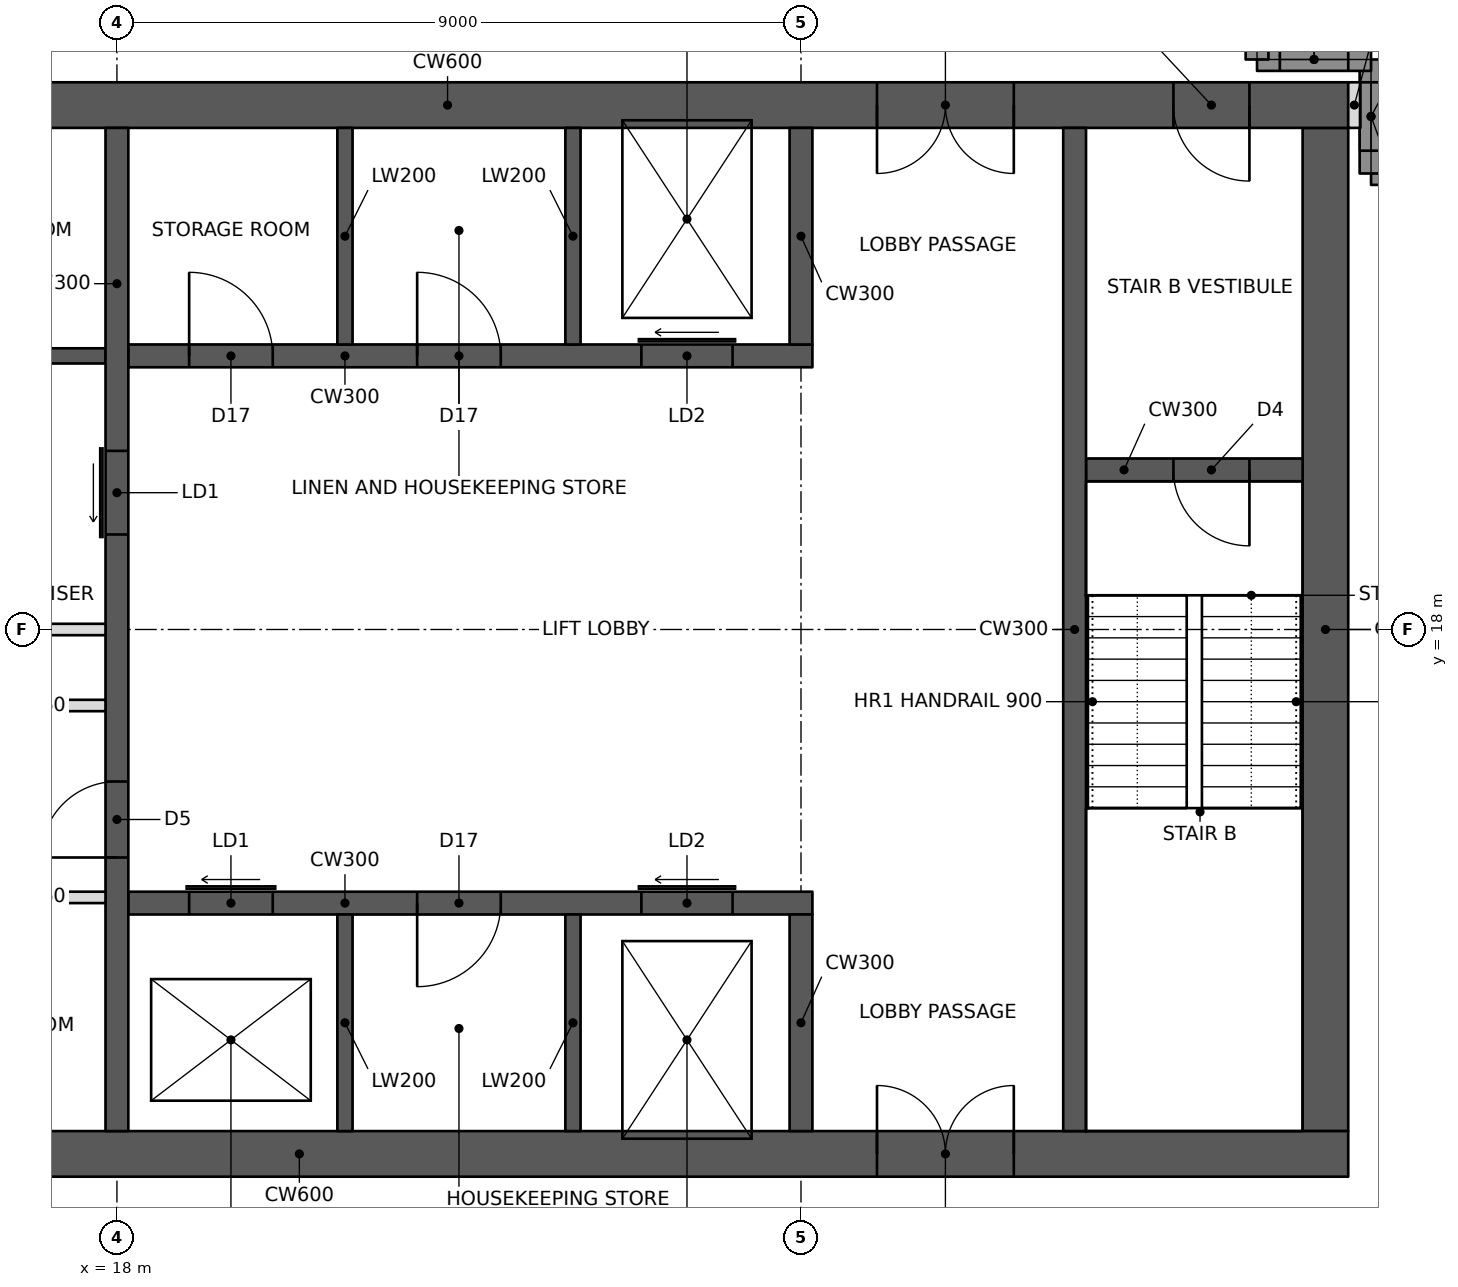
"""IFC4 building model, lengths in metres.
Left out: names, types, materials, properties, quantities, classifications, styles, units other than length and angle.
Written with IfcOpenShell. Run it as: python <this file> out.ifc"""

import sys

from ifc_helpers import new_model, si_unit, direction, frame, frame_2d, origin, place, context, subcontext, project, spatial, rectangle, extrude, element, fill, save


model = new_model("IFC4")
c1 = context("Model", 3, precision=1e-05, world=origin(), true_north=direction((0.0, 1.0)))
c2 = subcontext(c1, "Body", "Model", "MODEL_VIEW")
j1 = project(units=[si_unit("LENGTHUNIT", "METRE"), si_unit("PLANEANGLEUNIT", "RADIAN")], contexts=[c1])
p1 = place(None, origin())
s1 = spatial("IfcSite", under=j1, at=p1, CompositionType="ELEMENT")
p2 = place(p1, origin())
s2 = spatial("IfcBuilding", under=s1, at=p2, CompositionType="ELEMENT")
p3 = place(p2, frame((0.0, 0.0, 230.2)))
s3 = spatial("IfcBuildingStorey", under=s2, at=p3, CompositionType="ELEMENT", Elevation=230.2)
p4 = place(p3, frame((10.8, 11.1, 0.0), z_axis=(0.0, 0.0, 1.0), x_axis=(1.0, 0.0, 0.0)))
e1 = element("IfcWall", 1, at=p4, inside=s3, PredefinedType="SHEAR", context=c2, shape_type="SweptSolid", body=[
    extrude(rectangle(XDim=23.4, YDim=0.6, at=frame_2d((11.7, 0.0))), origin(), (0.0, 0.0, 1.0), 3.6),
])
p5 = place(p4, frame((1.0, 0.0, 0.0)))
e2 = element("IfcOpeningElement", 2, at=p5, cuts=e1, PredefinedType="OPENING", context=c2, shape_type="SweptSolid", body=[
    extrude(rectangle(XDim=1.0, YDim=2.1, at=frame_2d((0.5, 1.05))), frame((0.0, 0.31, 0.0), z_axis=(0.0, -1.0, 0.0), x_axis=(1.0, 0.0, 0.0)), (0.0, 0.0, 1.0), 0.62),
])
p6 = place(p4, frame((17.2, 0.0, 0.0)))
e3 = element("IfcOpeningElement", 3, at=p6, cuts=e1, PredefinedType="OPENING", context=c2, shape_type="SweptSolid", body=[
    extrude(rectangle(XDim=1.8, YDim=2.1, at=frame_2d((0.9, 1.05))), frame((0.0, 0.31, 0.0), z_axis=(0.0, -1.0, 0.0), x_axis=(1.0, 0.0, 0.0)), (0.0, 0.0, 1.0), 0.62),
])
p7 = place(p3, frame((10.8, 24.9, 0.0), z_axis=(0.0, 0.0, 1.0), x_axis=(1.0, 0.0, 0.0)))
e4 = element("IfcWall", 4, at=p7, inside=s3, PredefinedType="SHEAR", context=c2, shape_type="SweptSolid", body=[
    extrude(rectangle(XDim=23.4, YDim=0.6, at=frame_2d((11.7, 0.0))), origin(), (0.0, 0.0, 1.0), 3.6),
])
p8 = place(p7, frame((17.2, 0.0, 0.0)))
e5 = element("IfcOpeningElement", 5, at=p8, cuts=e4, PredefinedType="OPENING", context=c2, shape_type="SweptSolid", body=[
    extrude(rectangle(XDim=1.8, YDim=2.1, at=frame_2d((0.9, 1.05))), frame((0.0, 0.31, 0.0), z_axis=(0.0, -1.0, 0.0), x_axis=(1.0, 0.0, 0.0)), (0.0, 0.0, 1.0), 0.62),
])
p9 = place(p7, frame((21.1, 0.0, 0.0)))
e6 = element("IfcOpeningElement", 6, at=p9, cuts=e4, PredefinedType="OPENING", context=c2, shape_type="SweptSolid", body=[
    extrude(rectangle(XDim=1.0, YDim=2.1, at=frame_2d((0.5, 1.05))), frame((0.0, 0.31, 0.0), z_axis=(0.0, -1.0, 0.0), x_axis=(1.0, 0.0, 0.0)), (0.0, 0.0, 1.0), 0.62),
])
p10 = place(p7, frame((4.9, 0.0, 0.0)))
e7 = element("IfcOpeningElement", 7, at=p10, cuts=e4, PredefinedType="OPENING", context=c2, shape_type="SweptSolid", body=[
    extrude(rectangle(XDim=1.0, YDim=2.1, at=frame_2d((0.5, 1.05))), frame((0.0, 0.31, 0.0), z_axis=(0.0, -1.0, 0.0), x_axis=(1.0, 0.0, 0.0)), (0.0, 0.0, 1.0), 0.62),
])
p11 = place(p3, frame((33.9, 11.4, 0.0), z_axis=(0.0, 0.0, 1.0), x_axis=(0.0, 1.0, 0.0)))
e8 = element("IfcWall", 8, at=p11, inside=s3, PredefinedType="SHEAR", context=c2, shape_type="SweptSolid", body=[
    extrude(rectangle(XDim=13.2, YDim=0.6, at=frame_2d((6.6, 0.0))), origin(), (0.0, 0.0, 1.0), 3.6),
])
p12 = place(p3, frame((18.0, 11.4, 0.0), z_axis=(0.0, 0.0, 1.0), x_axis=(0.0, 1.0, 0.0)))
e9 = element("IfcWall", 9, at=p12, inside=s3, PredefinedType="SHEAR", context=c2, shape_type="SweptSolid", body=[
    extrude(rectangle(XDim=13.2, YDim=0.3, at=frame_2d((6.6, 0.0))), origin(), (0.0, 0.0, 1.0), 3.6),
])
p13 = place(p12, frame((3.6, 0.0, 0.0)))
e10 = element("IfcOpeningElement", 10, at=p13, cuts=e9, PredefinedType="OPENING", context=c2, shape_type="SweptSolid", body=[
    extrude(rectangle(XDim=1.0, YDim=2.1, at=frame_2d((0.5, 1.05))), frame((0.0, 0.16, 0.0), z_axis=(0.0, -1.0, 0.0), x_axis=(1.0, 0.0, 0.0)), (0.0, 0.0, 1.0), 0.32),
])
p14 = place(p12, frame((7.85, 0.0, 0.0)))
e11 = element("IfcOpeningElement", 11, at=p14, cuts=e9, PredefinedType="OPENING", context=c2, shape_type="SweptSolid", body=[
    extrude(rectangle(XDim=1.1, YDim=2.1, at=frame_2d((0.55, 1.05))), frame((0.0, 0.16, 0.0), z_axis=(0.0, -1.0, 0.0), x_axis=(1.0, 0.0, 0.0)), (0.0, 0.0, 1.0), 0.32),
])
p15 = place(p3, frame((14.55, 18.0, 0.0), z_axis=(0.0, 0.0, 1.0), x_axis=(1.0, 0.0, 0.0)))
e12 = element("IfcWall", 12, at=p15, inside=s3, PredefinedType="PARTITIONING", context=c2, shape_type="SweptSolid", body=[
    extrude(rectangle(XDim=3.3, YDim=0.15, at=frame_2d((1.65, 0.0))), origin(), (0.0, 0.0, 1.0), 3.4),
])
p16 = place(p3, frame((18.15, 14.4, 0.0), z_axis=(0.0, 0.0, 1.0), x_axis=(1.0, 0.0, 0.0)))
e13 = element("IfcWall", 13, at=p16, inside=s3, PredefinedType="SHEAR", context=c2, shape_type="SweptSolid", body=[
    extrude(rectangle(XDim=9.0, YDim=0.3, at=frame_2d((4.5, 0.0))), origin(), (0.0, 0.0, 1.0), 3.6),
])
p17 = place(p16, frame((0.8, 0.0, 0.0)))
e14 = element("IfcOpeningElement", 14, at=p17, cuts=e13, PredefinedType="OPENING", context=c2, shape_type="SweptSolid", body=[
    extrude(rectangle(XDim=1.1, YDim=2.1, at=frame_2d((0.55, 1.05))), frame((0.0, 0.16, 0.0), z_axis=(0.0, -1.0, 0.0), x_axis=(1.0, 0.0, 0.0)), (0.0, 0.0, 1.0), 0.32),
])
p18 = place(p16, frame((6.75, 0.0, 0.0)))
e15 = element("IfcOpeningElement", 15, at=p18, cuts=e13, PredefinedType="OPENING", context=c2, shape_type="SweptSolid", body=[
    extrude(rectangle(XDim=1.2, YDim=2.1, at=frame_2d((0.6, 1.05))), frame((0.0, 0.16, 0.0), z_axis=(0.0, -1.0, 0.0), x_axis=(1.0, 0.0, 0.0)), (0.0, 0.0, 1.0), 0.32),
])
p19 = place(p16, frame((3.8, 0.0, 0.0)))
e16 = element("IfcOpeningElement", 16, at=p19, cuts=e13, PredefinedType="OPENING", context=c2, shape_type="SweptSolid", body=[
    extrude(rectangle(XDim=1.1, YDim=2.1, at=frame_2d((0.55, 1.05))), frame((0.0, 0.16, 0.0), z_axis=(0.0, -1.0, 0.0), x_axis=(1.0, 0.0, 0.0)), (0.0, 0.0, 1.0), 0.32),
])
p20 = place(p3, frame((27.0, 11.4, 0.0), z_axis=(0.0, 0.0, 1.0), x_axis=(0.0, 1.0, 0.0)))
e17 = element("IfcWall", 17, at=p20, inside=s3, PredefinedType="SHEAR", context=c2, shape_type="SweptSolid", body=[
    extrude(rectangle(XDim=2.85, YDim=0.3, at=frame_2d((1.425, 0.0))), origin(), (0.0, 0.0, 1.0), 3.6),
])
for number, where, z_axis, x_axis in (
    (18, (21.0, 11.4, 0.0), (0.0, 0.0, 1.0), (0.0, 1.0, 0.0)),
    (19, (24.0, 11.4, 0.0), (0.0, 0.0, 1.0), (0.0, 1.0, 0.0)),
):
    element("IfcWall", number, at=place(p3, frame(where, z_axis=z_axis, x_axis=x_axis)), inside=s3, PredefinedType="SHEAR", context=c2, shape_type="SweptSolid", body=[
        extrude(rectangle(XDim=2.85, YDim=0.2, at=frame_2d((1.425, 0.0))), origin(), (0.0, 0.0, 1.0), 3.6),
    ])
p21 = place(p3, frame((18.15, 21.6, 0.0), z_axis=(0.0, 0.0, 1.0), x_axis=(1.0, 0.0, 0.0)))
e20 = element("IfcWall", 20, at=p21, inside=s3, PredefinedType="SHEAR", context=c2, shape_type="SweptSolid", body=[
    extrude(rectangle(XDim=9.0, YDim=0.3, at=frame_2d((4.5, 0.0))), origin(), (0.0, 0.0, 1.0), 3.6),
])
p22 = place(p21, frame((6.75, 0.0, 0.0)))
e21 = element("IfcOpeningElement", 21, at=p22, cuts=e20, PredefinedType="OPENING", context=c2, shape_type="SweptSolid", body=[
    extrude(rectangle(XDim=1.2, YDim=2.1, at=frame_2d((0.6, 1.05))), frame((0.0, 0.16, 0.0), z_axis=(0.0, -1.0, 0.0), x_axis=(1.0, 0.0, 0.0)), (0.0, 0.0, 1.0), 0.32),
])
p23 = place(p21, frame((0.8, 0.0, 0.0)))
e22 = element("IfcOpeningElement", 22, at=p23, cuts=e20, PredefinedType="OPENING", context=c2, shape_type="SweptSolid", body=[
    extrude(rectangle(XDim=1.1, YDim=2.1, at=frame_2d((0.55, 1.05))), frame((0.0, 0.16, 0.0), z_axis=(0.0, -1.0, 0.0), x_axis=(1.0, 0.0, 0.0)), (0.0, 0.0, 1.0), 0.32),
])
p24 = place(p21, frame((3.8, 0.0, 0.0)))
e23 = element("IfcOpeningElement", 23, at=p24, cuts=e20, PredefinedType="OPENING", context=c2, shape_type="SweptSolid", body=[
    extrude(rectangle(XDim=1.1, YDim=2.1, at=frame_2d((0.55, 1.05))), frame((0.0, 0.16, 0.0), z_axis=(0.0, -1.0, 0.0), x_axis=(1.0, 0.0, 0.0)), (0.0, 0.0, 1.0), 0.32),
])
p25 = place(p3, frame((27.0, 21.75, 0.0), z_axis=(0.0, 0.0, 1.0), x_axis=(0.0, 1.0, 0.0)))
e24 = element("IfcWall", 24, at=p25, inside=s3, PredefinedType="SHEAR", context=c2, shape_type="SweptSolid", body=[
    extrude(rectangle(XDim=2.85, YDim=0.3, at=frame_2d((1.425, 0.0))), origin(), (0.0, 0.0, 1.0), 3.6),
])
for number, where, z_axis, x_axis in (
    (25, (21.0, 21.75, 0.0), (0.0, 0.0, 1.0), (0.0, 1.0, 0.0)),
    (26, (24.0, 21.75, 0.0), (0.0, 0.0, 1.0), (0.0, 1.0, 0.0)),
):
    element("IfcWall", number, at=place(p3, frame(where, z_axis=z_axis, x_axis=x_axis)), inside=s3, PredefinedType="SHEAR", context=c2, shape_type="SweptSolid", body=[
        extrude(rectangle(XDim=2.85, YDim=0.2, at=frame_2d((1.425, 0.0))), origin(), (0.0, 0.0, 1.0), 3.6),
    ])
p26 = place(p3, frame((30.6, 11.4, 0.0), z_axis=(0.0, 0.0, 1.0), x_axis=(0.0, 1.0, 0.0)))
e27 = element("IfcWall", 27, at=p26, inside=s3, PredefinedType="SHEAR", context=c2, shape_type="SweptSolid", body=[
    extrude(rectangle(XDim=13.2, YDim=0.3, at=frame_2d((6.6, 0.0))), origin(), (0.0, 0.0, 1.0), 3.6),
])
p27 = place(p3, frame((30.75, 20.1, 0.0), z_axis=(0.0, 0.0, 1.0), x_axis=(1.0, 0.0, 0.0)))
e28 = element("IfcWall", 28, at=p27, inside=s3, PredefinedType="SHEAR", context=c2, shape_type="SweptSolid", body=[
    extrude(rectangle(XDim=2.85, YDim=0.3, at=frame_2d((1.425, 0.0))), origin(), (0.0, 0.0, 1.0), 3.6),
])
p28 = place(p27, frame((1.15, 0.0, 0.0)))
e29 = element("IfcOpeningElement", 29, at=p28, cuts=e28, PredefinedType="OPENING", context=c2, shape_type="SweptSolid", body=[
    extrude(rectangle(XDim=1.0, YDim=2.1, at=frame_2d((0.5, 1.05))), frame((0.0, 0.16, 0.0), z_axis=(0.0, -1.0, 0.0), x_axis=(1.0, 0.0, 0.0)), (0.0, 0.0, 1.0), 0.32),
])
p29 = place(p3, frame((14.55, 21.6, 0.0), z_axis=(0.0, 0.0, 1.0), x_axis=(1.0, 0.0, 0.0)))
e30 = element("IfcWall", 30, at=p29, inside=s3, PredefinedType="SHEAR", context=c2, shape_type="SweptSolid", body=[
    extrude(rectangle(XDim=3.3, YDim=0.2, at=frame_2d((1.65, 0.0))), origin(), (0.0, 0.0, 1.0), 3.6),
])
p30 = place(p3, frame((36.0, 24.0, 0.0), z_axis=(0.0, 0.0, 1.0), x_axis=(-1.0, 0.0, 0.0)))
e31 = element("IfcWall", 31, at=p30, inside=s3, PredefinedType="SOLIDWALL", context=c2, shape_type="SweptSolid", body=[
    extrude(rectangle(XDim=1.5, YDim=0.3, at=frame_2d((0.75, 0.0))), origin(), (0.0, 0.0, 1.0), 2.62),
])
p31 = place(p3, frame((34.5, 24.0, 0.0), z_axis=(0.0, 0.0, 1.0), x_axis=(0.0, 1.0, 0.0)))
e32 = element("IfcWall", 32, at=p31, inside=s3, PredefinedType="SOLIDWALL", context=c2, shape_type="SweptSolid", body=[
    extrude(rectangle(XDim=1.5, YDim=0.3, at=frame_2d((0.75, 0.0))), origin(), (0.0, 0.0, 1.0), 3.4),
])
p32 = place(p31, frame((0.3, 0.0, 0.6)))
e33 = element("IfcOpeningElement", 33, at=p32, cuts=e32, PredefinedType="OPENING", context=c2, shape_type="SweptSolid", body=[
    extrude(rectangle(XDim=0.9, YDim=2.2, at=frame_2d((0.45, 1.1))), frame((0.0, 0.16, 0.0), z_axis=(0.0, -1.0, 0.0), x_axis=(1.0, 0.0, 0.0)), (0.0, 0.0, 1.0), 0.32),
])
p33 = place(p3, frame((34.5, 25.5, 0.0), z_axis=(0.0, 0.0, 1.0), x_axis=(-1.0, 0.0, 0.0)))
e34 = element("IfcWall", 34, at=p33, inside=s3, PredefinedType="SOLIDWALL", context=c2, shape_type="SweptSolid", body=[
    extrude(rectangle(XDim=1.5, YDim=0.3, at=frame_2d((0.75, 0.0))), origin(), (0.0, 0.0, 1.0), 3.4),
])
p34 = place(p33, frame((0.3, 0.0, 0.6)))
e35 = element("IfcOpeningElement", 35, at=p34, cuts=e34, PredefinedType="OPENING", context=c2, shape_type="SweptSolid", body=[
    extrude(rectangle(XDim=0.9, YDim=2.2, at=frame_2d((0.45, 1.1))), frame((0.0, 0.16, 0.0), z_axis=(0.0, -1.0, 0.0), x_axis=(1.0, 0.0, 0.0)), (0.0, 0.0, 1.0), 0.32),
])
p35 = place(p3, frame((33.0, 25.5, 0.0), z_axis=(0.0, 0.0, 1.0), x_axis=(0.0, 1.0, 0.0)))
e36 = element("IfcWall", 36, at=p35, inside=s3, PredefinedType="SOLIDWALL", context=c2, shape_type="SweptSolid", body=[
    extrude(rectangle(XDim=1.5, YDim=0.3, at=frame_2d((0.75, 0.0))), origin(), (0.0, 0.0, 1.0), 2.62),
])
p36 = place(p3, frame((34.2, 24.9, 0.0), z_axis=(0.0, 0.0, 1.0), x_axis=(1.0, 0.0, 0.0)))
e37 = element("IfcWall", 37, at=p36, inside=s3, PredefinedType="PARTITIONING", context=c2, shape_type="SweptSolid", body=[
    extrude(rectangle(XDim=0.16, YDim=0.6, at=frame_2d((0.08, 0.0))), origin(), (0.0, 0.0, 1.0), 3.4),
])
p37 = place(p3, frame((14.55, 17.0, 0.0), z_axis=(0.0, 0.0, 1.0), x_axis=(1.0, 0.0, 0.0)))
e38 = element("IfcWall", 38, at=p37, inside=s3, PredefinedType="PARTITIONING", context=c2, shape_type="SweptSolid", body=[
    extrude(rectangle(XDim=3.3, YDim=0.15, at=frame_2d((1.65, 0.0))), origin(), (0.0, 0.0, 1.0), 3.4),
])
p38 = place(p37, frame((0.3, 0.0, 0.0)))
e39 = element("IfcOpeningElement", 39, at=p38, cuts=e38, PredefinedType="OPENING", context=c2, shape_type="SweptSolid", body=[
    extrude(rectangle(XDim=1.0, YDim=2.1, at=frame_2d((0.5, 1.05))), frame((0.0, 0.085, 0.0), z_axis=(0.0, -1.0, 0.0), x_axis=(1.0, 0.0, 0.0)), (0.0, 0.0, 1.0), 0.17),
])
p39 = place(p3, frame((14.55, 14.475, 0.0), z_axis=(0.0, 0.0, 1.0), x_axis=(1.0, 0.0, 0.0)))
e40 = element("IfcWall", 40, at=p39, inside=s3, PredefinedType="PARTITIONING", context=c2, shape_type="SweptSolid", body=[
    extrude(rectangle(XDim=3.3, YDim=0.15, at=frame_2d((1.65, 0.0))), origin(), (0.0, 0.0, 1.0), 3.4),
])
p40 = place(p39, frame((0.3, 0.0, 0.0)))
e41 = element("IfcOpeningElement", 41, at=p40, cuts=e40, PredefinedType="OPENING", context=c2, shape_type="SweptSolid", body=[
    extrude(rectangle(XDim=1.0, YDim=2.1, at=frame_2d((0.5, 1.05))), frame((0.0, 0.085, 0.0), z_axis=(0.0, -1.0, 0.0), x_axis=(1.0, 0.0, 0.0)), (0.0, 0.0, 1.0), 0.17),
])
p41 = place(p32, origin())
e42 = element("IfcWindow", 42, at=p41, inside=s3, PartitioningType="SINGLE_PANEL", PredefinedType="WINDOW", context=c2, shape_type="SweptSolid", body=[
    extrude(rectangle(XDim=0.9, YDim=2.2, at=frame_2d((0.45, 1.1))), frame((0.0, 0.03, 0.0), z_axis=(0.0, -1.0, 0.0), x_axis=(1.0, 0.0, 0.0)), (0.0, 0.0, 1.0), 0.06),
])
fill(e33, e42)
p42 = place(p34, origin())
e43 = element("IfcWindow", 43, at=p42, inside=s3, PartitioningType="SINGLE_PANEL", PredefinedType="WINDOW", context=c2, shape_type="SweptSolid", body=[
    extrude(rectangle(XDim=0.9, YDim=2.2, at=frame_2d((0.45, 1.1))), frame((0.0, 0.03, 0.0), z_axis=(0.0, -1.0, 0.0), x_axis=(1.0, 0.0, 0.0)), (0.0, 0.0, 1.0), 0.06),
])
fill(e35, e43)
p43 = place(p6, origin())
e44 = element("IfcDoor", 44, at=p43, inside=s3, OperationType="DOUBLE_DOOR_SINGLE_SWING", PredefinedType="DOOR", context=c2, shape_type="SweptSolid", body=[
    extrude(rectangle(XDim=1.8, YDim=2.1, at=frame_2d((0.9, 1.05))), frame((0.0, 0.025, 0.0), z_axis=(0.0, -1.0, 0.0), x_axis=(1.0, 0.0, 0.0)), (0.0, 0.0, 1.0), 0.05),
])
fill(e3, e44)
p44 = place(p8, frame((1.8, 0.0, 0.0), z_axis=(0.0, 0.0, 1.0), x_axis=(-1.0, 0.0, 0.0)))
e45 = element("IfcDoor", 45, at=p44, inside=s3, OperationType="DOUBLE_DOOR_SINGLE_SWING", PredefinedType="DOOR", context=c2, shape_type="SweptSolid", body=[
    extrude(rectangle(XDim=1.8, YDim=2.1, at=frame_2d((0.9, 1.05))), frame((0.0, 0.025, 0.0), z_axis=(0.0, -1.0, 0.0), x_axis=(1.0, 0.0, 0.0)), (0.0, 0.0, 1.0), 0.05),
])
fill(e5, e45)
p45 = place(p9, frame((1.0, 0.0, 0.0), z_axis=(0.0, 0.0, 1.0), x_axis=(-1.0, 0.0, 0.0)))
e46 = element("IfcDoor", 46, at=p45, inside=s3, OperationType="SINGLE_SWING_LEFT", PredefinedType="DOOR", context=c2, shape_type="SweptSolid", body=[
    extrude(rectangle(XDim=1.0, YDim=2.1, at=frame_2d((0.5, 1.05))), frame((0.0, 0.025, 0.0), z_axis=(0.0, -1.0, 0.0), x_axis=(1.0, 0.0, 0.0)), (0.0, 0.0, 1.0), 0.05),
])
fill(e6, e46)
p46 = place(p28, frame((1.0, 0.0, 0.0), z_axis=(0.0, 0.0, 1.0), x_axis=(-1.0, 0.0, 0.0)))
e47 = element("IfcDoor", 47, at=p46, inside=s3, OperationType="SINGLE_SWING_LEFT", PredefinedType="DOOR", context=c2, shape_type="SweptSolid", body=[
    extrude(rectangle(XDim=1.0, YDim=2.1, at=frame_2d((0.5, 1.05))), frame((0.0, 0.025, 0.0), z_axis=(0.0, -1.0, 0.0), x_axis=(1.0, 0.0, 0.0)), (0.0, 0.0, 1.0), 0.05),
])
fill(e29, e47)
p47 = place(p13, origin())
e48 = element("IfcDoor", 48, at=p47, inside=s3, OperationType="SINGLE_SWING_LEFT", PredefinedType="DOOR", context=c2, shape_type="SweptSolid", body=[
    extrude(rectangle(XDim=1.0, YDim=2.1, at=frame_2d((0.5, 1.05))), frame((0.0, 0.025, 0.0), z_axis=(0.0, -1.0, 0.0), x_axis=(1.0, 0.0, 0.0)), (0.0, 0.0, 1.0), 0.05),
])
fill(e10, e48)
p48 = place(p17, origin())
e49 = element("IfcDoor", 49, at=p48, inside=s3, OperationType="SLIDING_TO_LEFT", PredefinedType="DOOR", context=c2, shape_type="SweptSolid", body=[
    extrude(rectangle(XDim=1.1, YDim=2.1, at=frame_2d((0.55, 1.05))), frame((0.0, 0.025, 0.0), z_axis=(0.0, -1.0, 0.0), x_axis=(1.0, 0.0, 0.0)), (0.0, 0.0, 1.0), 0.05),
])
fill(e14, e49)
p49 = place(p14, origin())
e50 = element("IfcDoor", 50, at=p49, inside=s3, OperationType="SLIDING_TO_LEFT", PredefinedType="DOOR", context=c2, shape_type="SweptSolid", body=[
    extrude(rectangle(XDim=1.1, YDim=2.1, at=frame_2d((0.55, 1.05))), frame((0.0, 0.025, 0.0), z_axis=(0.0, -1.0, 0.0), x_axis=(1.0, 0.0, 0.0)), (0.0, 0.0, 1.0), 0.05),
])
fill(e11, e50)
p50 = place(p18, origin())
e51 = element("IfcDoor", 51, at=p50, inside=s3, OperationType="SLIDING_TO_LEFT", PredefinedType="DOOR", context=c2, shape_type="SweptSolid", body=[
    extrude(rectangle(XDim=1.2, YDim=2.1, at=frame_2d((0.6, 1.05))), frame((0.0, 0.025, 0.0), z_axis=(0.0, -1.0, 0.0), x_axis=(1.0, 0.0, 0.0)), (0.0, 0.0, 1.0), 0.05),
])
fill(e15, e51)
p51 = place(p22, origin())
e52 = element("IfcDoor", 52, at=p51, inside=s3, OperationType="SLIDING_TO_LEFT", PredefinedType="DOOR", context=c2, shape_type="SweptSolid", body=[
    extrude(rectangle(XDim=1.2, YDim=2.1, at=frame_2d((0.6, 1.05))), frame((0.0, 0.025, 0.0), z_axis=(0.0, -1.0, 0.0), x_axis=(1.0, 0.0, 0.0)), (0.0, 0.0, 1.0), 0.05),
])
fill(e21, e52)
p52 = place(p23, origin())
e53 = element("IfcDoor", 53, at=p52, inside=s3, OperationType="SINGLE_SWING_LEFT", PredefinedType="DOOR", context=c2, shape_type="SweptSolid", body=[
    extrude(rectangle(XDim=1.1, YDim=2.1, at=frame_2d((0.55, 1.05))), frame((0.0, 0.025, 0.0), z_axis=(0.0, -1.0, 0.0), x_axis=(1.0, 0.0, 0.0)), (0.0, 0.0, 1.0), 0.05),
])
fill(e22, e53)
p53 = place(p24, origin())
e54 = element("IfcDoor", 54, at=p53, inside=s3, OperationType="SINGLE_SWING_LEFT", PredefinedType="DOOR", context=c2, shape_type="SweptSolid", body=[
    extrude(rectangle(XDim=1.1, YDim=2.1, at=frame_2d((0.55, 1.05))), frame((0.0, 0.025, 0.0), z_axis=(0.0, -1.0, 0.0), x_axis=(1.0, 0.0, 0.0)), (0.0, 0.0, 1.0), 0.05),
])
fill(e23, e54)
p54 = place(p19, frame((1.1, 0.0, 0.0), z_axis=(0.0, 0.0, 1.0), x_axis=(-1.0, 0.0, 0.0)))
e55 = element("IfcDoor", 55, at=p54, inside=s3, OperationType="SINGLE_SWING_RIGHT", PredefinedType="DOOR", context=c2, shape_type="SweptSolid", body=[
    extrude(rectangle(XDim=1.1, YDim=2.1, at=frame_2d((0.55, 1.05))), frame((0.0, 0.025, 0.0), z_axis=(0.0, -1.0, 0.0), x_axis=(1.0, 0.0, 0.0)), (0.0, 0.0, 1.0), 0.05),
])
fill(e16, e55)
save(model, sys.argv[1])
